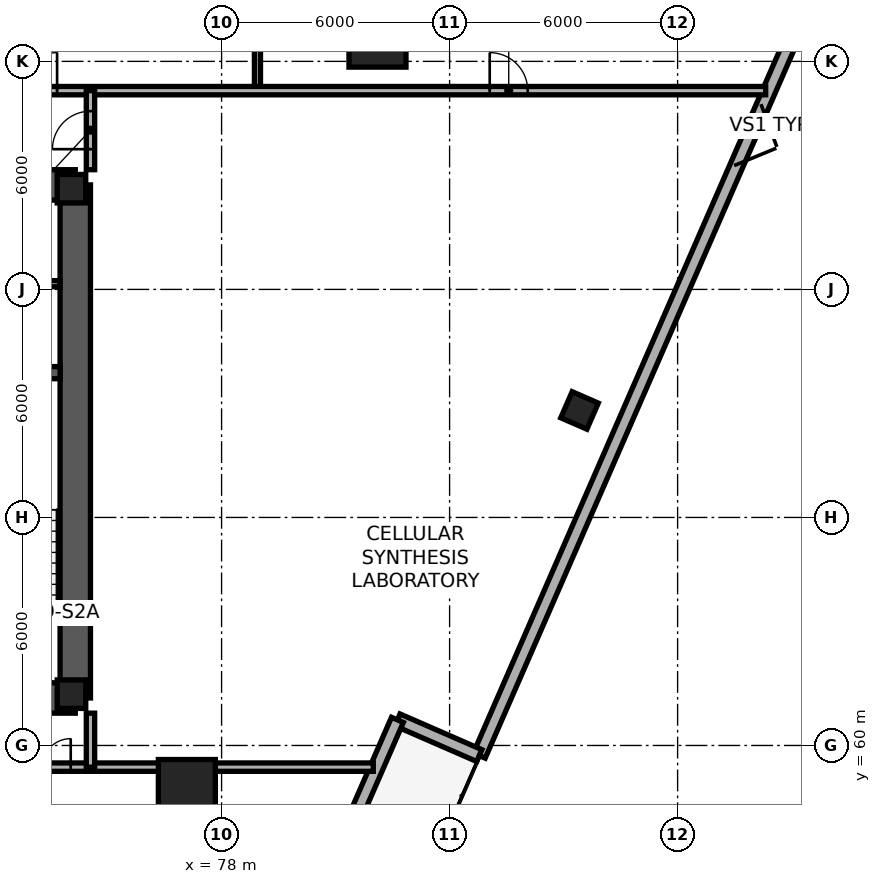
"""IFC4 building model, lengths in metres.
Left out: names, types, materials, properties, quantities, classifications, styles, units other than length and angle.
Written with IfcOpenShell. Run it as: python <this file> out.ifc"""

import sys

from ifc_helpers import new_model, si_unit, direction, frame, frame_2d, origin, origin_2d, place, context, subcontext, project, spatial, rectangle, extrude, element, fill, save


model = new_model("IFC4")
c1 = context("Model", 3, precision=1e-05, world=origin(), true_north=direction((0.0, 1.0)))
c2 = subcontext(c1, "Body", "Model", "MODEL_VIEW")
j1 = project(units=[si_unit("LENGTHUNIT", "METRE"), si_unit("PLANEANGLEUNIT", "RADIAN")], contexts=[c1])
p1 = place(None, origin())
s1 = spatial("IfcSite", under=j1, at=p1, CompositionType="ELEMENT")
p2 = place(p1, origin())
s2 = spatial("IfcBuilding", under=s1, at=p2, CompositionType="ELEMENT")
p3 = place(p2, frame((0.0, 0.0, 149.1)))
s3 = spatial("IfcBuildingStorey", under=s2, at=p3, CompositionType="ELEMENT", Elevation=149.1)
p4 = place(p3, frame((57.85, 61.25, 0.0), z_axis=(0.0, 0.0, 1.0), x_axis=(1.0, 0.0, 0.0)))
e1 = element("IfcWall", 1, at=p4, inside=s3, PredefinedType="SHEAR", context=c2, shape_type="SweptSolid", body=[
    extrude(rectangle(XDim=16.3, YDim=0.8, at=frame_2d((8.15, 0.0))), origin(), (0.0, 0.0, 1.0), 3.65),
])
p5 = place(p4, frame((1.35, 0.0, 0.0)))
e2 = element("IfcOpeningElement", 2, at=p5, cuts=e1, PredefinedType="OPENING", context=c2, shape_type="SweptSolid", body=[
    extrude(rectangle(XDim=1.15, YDim=2.15, at=frame_2d((0.575, 1.075))), frame((0.0, 0.41, 0.0), z_axis=(0.0, -1.0, 0.0), x_axis=(1.0, 0.0, 0.0)), (0.0, 0.0, 1.0), 0.82),
])
p6 = place(p4, frame((6.1, 0.0, 0.0)))
e3 = element("IfcOpeningElement", 3, at=p6, cuts=e1, PredefinedType="OPENING", context=c2, shape_type="SweptSolid", body=[
    extrude(rectangle(XDim=1.6, YDim=2.15, at=frame_2d((0.8, 1.075))), frame((0.0, 0.41, 0.0), z_axis=(0.0, -1.0, 0.0), x_axis=(1.0, 0.0, 0.0)), (0.0, 0.0, 1.0), 0.82),
])
p7 = place(p4, frame((13.55, 0.0, 0.0)))
e4 = element("IfcOpeningElement", 4, at=p7, cuts=e1, PredefinedType="OPENING", context=c2, shape_type="SweptSolid", body=[
    extrude(rectangle(XDim=1.15, YDim=2.15, at=frame_2d((0.575, 1.075))), frame((0.0, 0.41, 0.0), z_axis=(0.0, -1.0, 0.0), x_axis=(1.0, 0.0, 0.0)), (0.0, 0.0, 1.0), 0.82),
])
p8 = place(p3, frame((74.15, 61.25, 0.0), z_axis=(0.0, 0.0, 1.0), x_axis=(0.0, 1.0, 0.0)))
e5 = element("IfcWall", 5, at=p8, inside=s3, PredefinedType="SHEAR", context=c2, shape_type="SweptSolid", body=[
    extrude(rectangle(XDim=13.5, YDim=0.8, at=frame_2d((6.75, 0.0))), origin(), (0.0, 0.0, 1.0), 3.65),
])
p9 = place(p3, frame((74.15, 74.75, 0.0), z_axis=(0.0, 0.0, 1.0), x_axis=(-1.0, 0.0, 0.0)))
e6 = element("IfcWall", 6, at=p9, inside=s3, PredefinedType="SHEAR", context=c2, shape_type="SweptSolid", body=[
    extrude(rectangle(XDim=7.3, YDim=0.8, at=frame_2d((3.65, 0.0))), origin(), (0.0, 0.0, 1.0), 3.65),
])
p10 = place(p3, frame((69.91, 69.81, 0.0), z_axis=(0.0, 0.0, 1.0), x_axis=(1.0, 0.0, 0.0)))
e7 = element("IfcWall", 7, at=p10, inside=s3, PredefinedType="SHEAR", context=c2, shape_type="SweptSolid", body=[
    extrude(rectangle(XDim=3.84, YDim=0.32, at=frame_2d((1.92, 0.0))), origin(), (0.0, 0.0, 1.0), 3.65),
])
for number, where, z_axis, x_axis in (
    (8, (74.05, 61.35, 0.0), (0.0, 0.0, 1.0), (1.0, 0.0, 0.0)),
    (9, (74.05, 74.65, 0.0), (0.0, 0.0, 1.0), (1.0, 0.0, 0.0)),
):
    element("IfcColumn", number, at=place(p3, frame(where, z_axis=z_axis, x_axis=x_axis)), inside=s3, PredefinedType="COLUMN", context=c2, shape_type="SweptSolid", body=[
        extrude(rectangle(XDim=0.75, YDim=0.75, at=origin_2d()), origin(), (0.0, 0.0, 1.0), 3.65),
    ])
for number, where, z_axis, x_axis in (
    (10, (82.102, 78.599, 0.0), (0.0, 0.0, 1.0), (1.0, 0.0, 0.0)),
    (11, (77.086, 58.88, 0.0), (0.0, 0.0, 1.0), (1.0, 0.0, 0.0)),
):
    element("IfcColumn", number, at=place(p3, frame(where, z_axis=z_axis, x_axis=x_axis)), inside=s3, PredefinedType="COLUMN", context=c2, shape_type="SweptSolid", body=[
        extrude(rectangle(XDim=1.5, YDim=1.5, at=origin_2d()), origin(), (0.0, 0.0, 1.0), 3.65),
    ])
p11 = place(p3, frame((87.49, 68.825, 0.003), z_axis=(-0.039229493406, -0.00569028488, 0.999214024874), x_axis=(0.963817976871, -0.264073100935, 0.036335998986)))
e12 = element("IfcColumn", 12, at=p11, inside=s3, PredefinedType="COLUMN", context=c2, shape_type="SweptSolid", body=[
    extrude(rectangle(XDim=0.75, YDim=0.75, at=origin_2d()), origin(), (0.0, 0.0, 1.0), 3.647),
])
p12 = place(p3, frame((94.159, 81.241, 0.0), z_axis=(0.0, 0.0, 1.0), x_axis=(-0.399698418424, -0.916646700921, 0.0)))
e13 = element("IfcWall", 13, at=p12, inside=s3, PredefinedType="STANDARD", context=c2, shape_type="SweptSolid", body=[
    extrude(rectangle(XDim=23.462, YDim=0.34, at=frame_2d((11.731, 0.0))), origin(), (0.0, 0.0, 1.0), 0.85),
])
p13 = place(p3, frame((84.781, 59.734, 0.0), z_axis=(0.0, 0.0, 1.0), x_axis=(-0.916654976367, 0.399679439429, 0.0)))
e14 = element("IfcWall", 14, at=p13, inside=s3, PredefinedType="STANDARD", context=c2, shape_type="SweptSolid", body=[
    extrude(rectangle(XDim=2.35, YDim=0.34, at=frame_2d((1.175, 0.0))), origin(), (0.0, 0.0, 1.0), 2.575),
])
p14 = place(p3, frame((82.627, 60.673, 0.0), z_axis=(0.0, 0.0, 1.0), x_axis=(-0.399697883631, -0.916646934114, 0.0)))
e15 = element("IfcWall", 15, at=p14, inside=s3, PredefinedType="STANDARD", context=c2, shape_type="SweptSolid", body=[
    extrude(rectangle(XDim=11.6, YDim=0.34, at=frame_2d((5.8, 0.0))), origin(), (0.0, 0.0, 1.0), 2.905),
])
p15 = place(p14, frame((9.05, 0.0, 0.0)))
e16 = element("IfcOpeningElement", 16, at=p15, cuts=e15, PredefinedType="OPENING", context=c2, shape_type="SweptSolid", body=[
    extrude(rectangle(XDim=1.9, YDim=2.3, at=frame_2d((0.95, 1.15))), frame((0.0, 0.18, 0.0), z_axis=(0.0, -1.0, 0.0), x_axis=(1.0, 0.0, 0.0)), (0.0, 0.0, 1.0), 0.36),
])
p16 = place(p3, frame((70.23, 72.15, 0.0), z_axis=(0.0, 0.0, 1.0), x_axis=(1.0, 0.0, 0.0)))
e17 = element("IfcWall", 17, at=p16, inside=s3, PredefinedType="PARTITIONING", context=c2, shape_type="SweptSolid", body=[
    extrude(rectangle(XDim=3.52, YDim=0.16, at=frame_2d((1.76, 0.0))), origin(), (0.0, 0.0, 1.0), 3.375),
])
p17 = place(p16, frame((1.15, 0.0, 0.0)))
e18 = element("IfcOpeningElement", 18, at=p17, cuts=e17, PredefinedType="OPENING", context=c2, shape_type="SweptSolid", body=[
    extrude(rectangle(XDim=0.92, YDim=2.05, at=frame_2d((0.46, 1.025))), frame((0.0, 0.09, 0.0), z_axis=(0.0, -1.0, 0.0), x_axis=(1.0, 0.0, 0.0)), (0.0, 0.0, 1.0), 0.18),
])
p18 = place(p3, frame((78.944, 77.23, 0.0), z_axis=(0.0, 0.0, 1.0), x_axis=(0.0, 1.0, 0.0)))
e19 = element("IfcWall", 19, at=p18, inside=s3, PredefinedType="PARTITIONING", context=c2, shape_type="SweptSolid", body=[
    extrude(rectangle(XDim=11.204, YDim=0.16, at=frame_2d((5.602, 0.0))), origin(), (0.0, 0.0, 1.0), 2.575),
])
p19 = place(p3, frame((39.683, 77.23, 0.0), z_axis=(0.0, 0.0, 1.0), x_axis=(1.0, 0.0, 0.0)))
e20 = element("IfcWall", 20, at=p19, inside=s3, PredefinedType="PARTITIONING", context=c2, shape_type="SweptSolid", body=[
    extrude(rectangle(XDim=52.634, YDim=0.22, at=frame_2d((26.317, 0.0))), origin(), (0.0, 0.0, 1.0), 2.575),
])
p20 = place(p19, frame((19.877, 0.0, 0.0)))
e21 = element("IfcOpeningElement", 21, at=p20, cuts=e20, PredefinedType="OPENING", context=c2, shape_type="SweptSolid", body=[
    extrude(rectangle(XDim=0.98, YDim=2.1, at=frame_2d((0.49, 1.05))), frame((0.0, 0.12, 0.0), z_axis=(0.0, -1.0, 0.0), x_axis=(1.0, 0.0, 0.0)), (0.0, 0.0, 1.0), 0.24),
])
p21 = place(p19, frame((22.702, 0.0, 0.0)))
e22 = element("IfcOpeningElement", 22, at=p21, cuts=e20, PredefinedType="OPENING", context=c2, shape_type="SweptSolid", body=[
    extrude(rectangle(XDim=0.98, YDim=2.1, at=frame_2d((0.49, 1.05))), frame((0.0, 0.12, 0.0), z_axis=(0.0, -1.0, 0.0), x_axis=(1.0, 0.0, 0.0)), (0.0, 0.0, 1.0), 0.24),
])
p22 = place(p19, frame((5.062, 0.0, 0.0)))
e23 = element("IfcOpeningElement", 23, at=p22, cuts=e20, PredefinedType="OPENING", context=c2, shape_type="SweptSolid", body=[
    extrude(rectangle(XDim=1.0, YDim=2.1, at=frame_2d((0.5, 1.05))), frame((0.0, 0.12, 0.0), z_axis=(0.0, -1.0, 0.0), x_axis=(1.0, 0.0, 0.0)), (0.0, 0.0, 1.0), 0.24),
])
p23 = place(p19, frame((13.474, 0.0, 0.0)))
e24 = element("IfcOpeningElement", 24, at=p23, cuts=e20, PredefinedType="OPENING", context=c2, shape_type="SweptSolid", body=[
    extrude(rectangle(XDim=1.0, YDim=2.1, at=frame_2d((0.5, 1.05))), frame((0.0, 0.12, 0.0), z_axis=(0.0, -1.0, 0.0), x_axis=(1.0, 0.0, 0.0)), (0.0, 0.0, 1.0), 0.24),
])
p24 = place(p19, frame((32.989, 0.0, 0.0)))
e25 = element("IfcOpeningElement", 25, at=p24, cuts=e20, PredefinedType="OPENING", context=c2, shape_type="SweptSolid", body=[
    extrude(rectangle(XDim=1.0, YDim=2.1, at=frame_2d((0.5, 1.05))), frame((0.0, 0.12, 0.0), z_axis=(0.0, -1.0, 0.0), x_axis=(1.0, 0.0, 0.0)), (0.0, 0.0, 1.0), 0.24),
])
p25 = place(p19, frame((45.373, 0.0, 0.0)))
e26 = element("IfcOpeningElement", 26, at=p25, cuts=e20, PredefinedType="OPENING", context=c2, shape_type="SweptSolid", body=[
    extrude(rectangle(XDim=1.0, YDim=2.1, at=frame_2d((0.5, 1.05))), frame((0.0, 0.12, 0.0), z_axis=(0.0, -1.0, 0.0), x_axis=(1.0, 0.0, 0.0)), (0.0, 0.0, 1.0), 0.24),
])
p26 = place(p3, frame((47.444, 59.43, 0.0), z_axis=(0.0, 0.0, 1.0), x_axis=(1.0, 0.0, 0.0)))
e27 = element("IfcWall", 27, at=p26, inside=s3, PredefinedType="PARTITIONING", context=c2, shape_type="SweptSolid", body=[
    extrude(rectangle(XDim=34.548, YDim=0.22, at=frame_2d((17.274, 0.0))), origin(), (0.0, 0.0, 1.0), 2.575),
])
p27 = place(p26, frame((10.224, 0.0, 0.0)))
e28 = element("IfcOpeningElement", 28, at=p27, cuts=e27, PredefinedType="OPENING", context=c2, shape_type="SweptSolid", body=[
    extrude(rectangle(XDim=1.5, YDim=2.2, at=frame_2d((0.75, 1.1))), frame((0.0, 0.12, 0.0), z_axis=(0.0, -1.0, 0.0), x_axis=(1.0, 0.0, 0.0)), (0.0, 0.0, 1.0), 0.24),
])
p28 = place(p26, frame((25.086, 0.0, 0.0)))
e29 = element("IfcOpeningElement", 29, at=p28, cuts=e27, PredefinedType="OPENING", context=c2, shape_type="SweptSolid", body=[
    extrude(rectangle(XDim=1.5, YDim=2.2, at=frame_2d((0.75, 1.1))), frame((0.0, 0.12, 0.0), z_axis=(0.0, -1.0, 0.0), x_axis=(1.0, 0.0, 0.0)), (0.0, 0.0, 1.0), 0.24),
])
p29 = place(p3, frame((74.55, 75.15, 0.0), z_axis=(0.0, 0.0, 1.0), x_axis=(0.0, 1.0, 0.0)))
e30 = element("IfcWall", 30, at=p29, inside=s3, PredefinedType="PARTITIONING", context=c2, shape_type="SweptSolid", body=[
    extrude(rectangle(XDim=2.08, YDim=0.22, at=frame_2d((1.04, 0.0))), origin(), (0.0, 0.0, 1.0), 3.375),
])
p30 = place(p29, frame((0.54, 0.0, 0.0)))
e31 = element("IfcOpeningElement", 31, at=p30, cuts=e30, PredefinedType="OPENING", context=c2, shape_type="SweptSolid", body=[
    extrude(rectangle(XDim=1.0, YDim=2.1, at=frame_2d((0.5, 1.05))), frame((0.0, 0.12, 0.0), z_axis=(0.0, -1.0, 0.0), x_axis=(1.0, 0.0, 0.0)), (0.0, 0.0, 1.0), 0.24),
])
p31 = place(p3, frame((74.55, 59.43, 0.0), z_axis=(0.0, 0.0, 1.0), x_axis=(0.0, 1.0, 0.0)))
e32 = element("IfcWall", 32, at=p31, inside=s3, PredefinedType="PARTITIONING", context=c2, shape_type="SweptSolid", body=[
    extrude(rectangle(XDim=1.42, YDim=0.22, at=frame_2d((0.71, 0.0))), origin(), (0.0, 0.0, 1.0), 2.705),
])
p32 = place(p24, origin())
e33 = element("IfcDoor", 33, at=p32, inside=s3, OperationType="SINGLE_SWING_RIGHT", PredefinedType="DOOR", context=c2, shape_type="SweptSolid", body=[
    extrude(rectangle(XDim=1.0, YDim=2.1, at=frame_2d((0.5, 1.05))), frame((0.0, 0.025, 0.0), z_axis=(0.0, -1.0, 0.0), x_axis=(1.0, 0.0, 0.0)), (0.0, 0.0, 1.0), 0.05),
])
fill(e25, e33)
p33 = place(p25, origin())
e34 = element("IfcDoor", 34, at=p33, inside=s3, OperationType="SINGLE_SWING_LEFT", PredefinedType="DOOR", context=c2, shape_type="SweptSolid", body=[
    extrude(rectangle(XDim=1.0, YDim=2.1, at=frame_2d((0.5, 1.05))), frame((0.0, 0.025, 0.0), z_axis=(0.0, -1.0, 0.0), x_axis=(1.0, 0.0, 0.0)), (0.0, 0.0, 1.0), 0.05),
])
fill(e26, e34)
p34 = place(p28, origin())
e35 = element("IfcDoor", 35, at=p34, inside=s3, OperationType="DOUBLE_DOOR_SINGLE_SWING", PredefinedType="DOOR", context=c2, shape_type="SweptSolid", body=[
    extrude(rectangle(XDim=1.5, YDim=2.2, at=frame_2d((0.75, 1.1))), frame((0.0, 0.025, 0.0), z_axis=(0.0, -1.0, 0.0), x_axis=(1.0, 0.0, 0.0)), (0.0, 0.0, 1.0), 0.05),
])
fill(e29, e35)
p35 = place(p30, origin())
e36 = element("IfcDoor", 36, at=p35, inside=s3, OperationType="SINGLE_SWING_LEFT", PredefinedType="DOOR", context=c2, shape_type="SweptSolid", body=[
    extrude(rectangle(XDim=1.0, YDim=2.1, at=frame_2d((0.5, 1.05))), frame((0.0, 0.025, 0.0), z_axis=(0.0, -1.0, 0.0), x_axis=(1.0, 0.0, 0.0)), (0.0, 0.0, 1.0), 0.05),
])
fill(e31, e36)
save(model, sys.argv[1])
